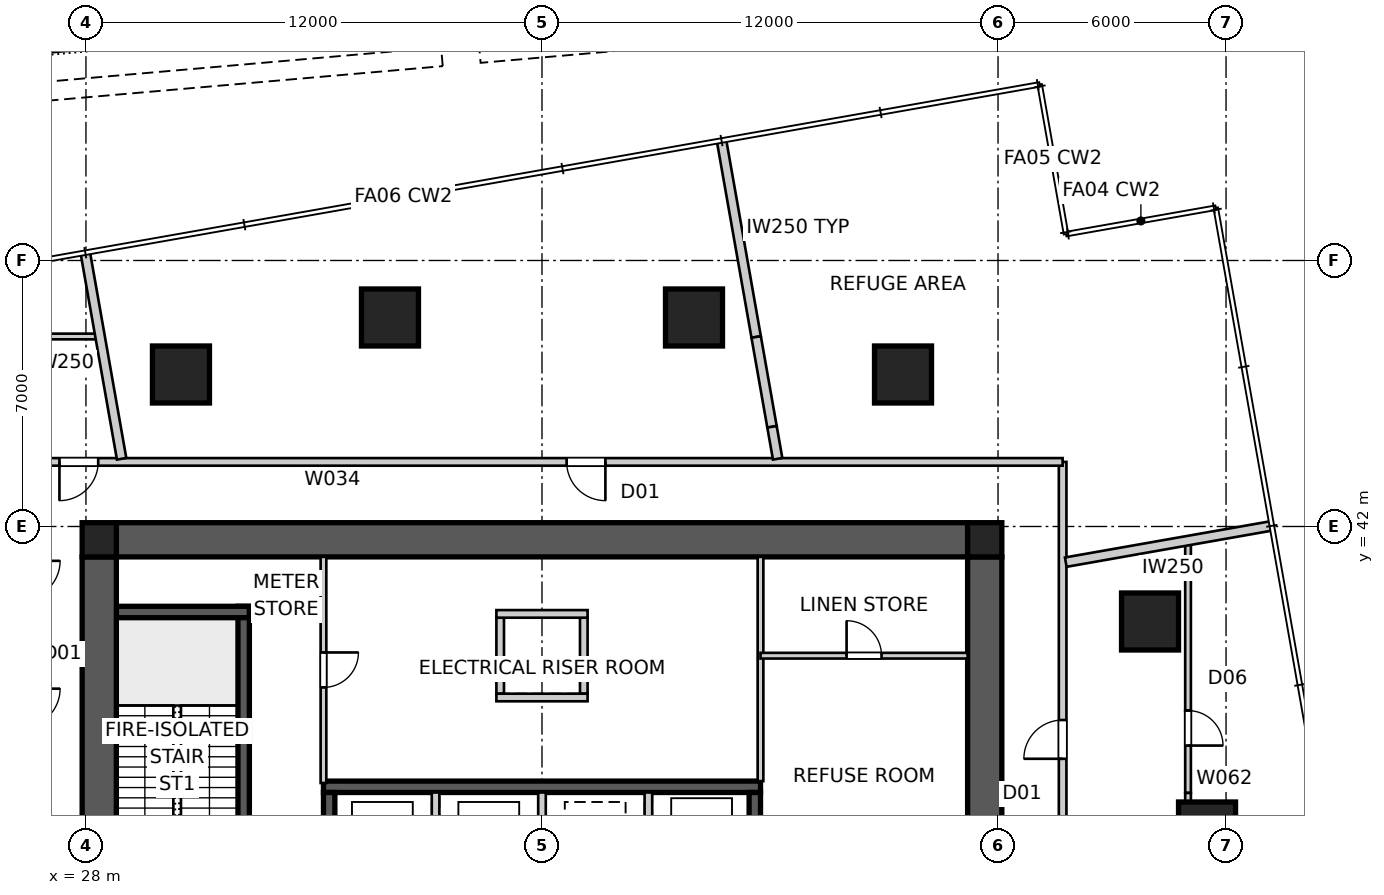
"""IFC4 building model, lengths in metres.
Left out: names, types, materials, properties, quantities, classifications, styles, units other than length and angle.
Written with IfcOpenShell. Run it as: python <this file> out.ifc"""

import sys

from ifc_helpers import new_model, si_unit, direction, frame, frame_2d, origin, origin_2d, place, context, subcontext, project, spatial, polyline, rectangle, outline, extrude, element, fill, save


model = new_model("IFC4")
c1 = context("Model", 3, precision=1e-05, world=origin(), true_north=direction((0.0, 1.0)))
c2 = subcontext(c1, "Body", "Model", "MODEL_VIEW")
j1 = project(units=[si_unit("LENGTHUNIT", "METRE"), si_unit("PLANEANGLEUNIT", "RADIAN")], contexts=[c1])
p1 = place(None, origin())
s1 = spatial("IfcSite", under=j1, at=p1, CompositionType="ELEMENT")
p2 = place(p1, origin())
s2 = spatial("IfcBuilding", under=s1, at=p2, CompositionType="ELEMENT")
p3 = place(p2, frame((0.0, 0.0, 74.4)))
s3 = spatial("IfcBuildingStorey", under=s2, at=p3, CompositionType="ELEMENT", Elevation=74.4)
p4 = place(p3, frame((28.8, 41.65, 0.0), z_axis=(0.0, 0.0, 1.0), x_axis=(1.0, 0.0, 0.0)))
e1 = element("IfcWall", 1, at=p4, inside=s3, PredefinedType="SHEAR", context=c2, shape_type="SweptSolid", body=[
    extrude(outline(polyline([(0.0, -0.45), (22.4, -0.45), (22.4, -0.025), (22.85, -0.025), (22.85, 0.025), (22.4, 0.025), (22.4, 0.45), (0.0, 0.45), (0.0, 0.025), (-0.45, 0.025), (-0.45, -0.025), (0.0, -0.025), (0.0, -0.45)])), origin(), (0.0, 0.0, 1.0), 5.0),
])
p5 = place(p3, frame((51.65, 18.8, 0.0), z_axis=(0.0, 0.0, 1.0), x_axis=(0.0, 1.0, 0.0)))
e2 = element("IfcWall", 2, at=p5, inside=s3, PredefinedType="SHEAR", context=c2, shape_type="SweptSolid", body=[
    extrude(outline(polyline([(0.0, -0.45), (22.4, -0.45), (22.4, -0.025), (22.85, -0.025), (22.85, 0.025), (22.4, 0.025), (22.4, 0.45), (0.0, 0.45), (0.0, 0.025), (-0.45, 0.025), (-0.45, -0.025), (0.0, -0.025), (0.0, -0.45)])), origin(), (0.0, 0.0, 1.0), 5.0),
])
p6 = place(p5, frame((11.14, 0.0, 0.0)))
e3 = element("IfcOpeningElement", 3, at=p6, cuts=e2, PredefinedType="OPENING", context=c2, shape_type="SweptSolid", body=[
    extrude(rectangle(XDim=1.02, YDim=2.4, at=frame_2d((0.51, 1.2))), frame((0.0, 0.46, 0.0), z_axis=(0.0, -1.0, 0.0), x_axis=(1.0, 0.0, 0.0)), (0.0, 0.0, 1.0), 0.92),
])
p7 = place(p3, frame((28.35, 41.2, 0.0), z_axis=(0.0, 0.0, 1.0), x_axis=(0.0, -1.0, 0.0)))
e4 = element("IfcWall", 4, at=p7, inside=s3, PredefinedType="SHEAR", context=c2, shape_type="SweptSolid", body=[
    extrude(outline(polyline([(0.0, -0.45), (22.4, -0.45), (22.4, -0.025), (22.85, -0.025), (22.85, 0.025), (22.4, 0.025), (22.4, 0.45), (0.0, 0.45), (0.0, 0.025), (-0.45, 0.025), (-0.45, -0.025), (0.0, -0.025), (0.0, -0.45)])), origin(), (0.0, 0.0, 1.0), 5.0),
])
p8 = place(p7, frame((11.14, 0.0, 0.0)))
e5 = element("IfcOpeningElement", 5, at=p8, cuts=e4, PredefinedType="OPENING", context=c2, shape_type="SweptSolid", body=[
    extrude(rectangle(XDim=1.02, YDim=2.4, at=frame_2d((0.51, 1.2))), frame((0.0, 0.46, 0.0), z_axis=(0.0, -1.0, 0.0), x_axis=(1.0, 0.0, 0.0)), (0.0, 0.0, 1.0), 0.92),
])
p9 = place(p3, frame((34.25, 35.15, 0.0), z_axis=(0.0, 0.0, 1.0), x_axis=(1.0, 0.0, 0.0)))
e6 = element("IfcWall", 6, at=p9, inside=s3, PredefinedType="SHEAR", context=c2, shape_type="SweptSolid", body=[
    extrude(rectangle(XDim=11.5, YDim=0.3, at=frame_2d((5.75, 0.0))), origin(), (0.0, 0.0, 1.0), 5.0),
])
p10 = place(p3, frame((34.4, 32.2, 0.0), z_axis=(0.0, 0.0, 1.0), x_axis=(0.0, 1.0, 0.0)))
e7 = element("IfcWall", 7, at=p10, inside=s3, PredefinedType="SHEAR", context=c2, shape_type="SweptSolid", body=[
    extrude(rectangle(XDim=2.8, YDim=0.3, at=frame_2d((1.4, 0.0))), origin(), (0.0, 0.0, 1.0), 5.0),
])
for number, where, z_axis, x_axis in (
    (8, (37.2, 32.2, 0.0), (0.0, 0.0, 1.0), (0.0, 1.0, 0.0)),
    (9, (40.0, 32.2, 0.0), (0.0, 0.0, 1.0), (0.0, 1.0, 0.0)),
    (10, (42.8, 32.2, 0.0), (0.0, 0.0, 1.0), (0.0, 1.0, 0.0)),
):
    element("IfcWall", number, at=place(p3, frame(where, z_axis=z_axis, x_axis=x_axis)), inside=s3, PredefinedType="SOLIDWALL", context=c2, shape_type="SweptSolid", body=[
        extrude(rectangle(XDim=2.8, YDim=0.2, at=frame_2d((1.4, 0.0))), origin(), (0.0, 0.0, 1.0), 5.0),
    ])
p11 = place(p3, frame((45.6, 32.2, 0.0), z_axis=(0.0, 0.0, 1.0), x_axis=(0.0, 1.0, 0.0)))
e11 = element("IfcWall", 11, at=p11, inside=s3, PredefinedType="SHEAR", context=c2, shape_type="SweptSolid", body=[
    extrude(rectangle(XDim=2.8, YDim=0.3, at=frame_2d((1.4, 0.0))), origin(), (0.0, 0.0, 1.0), 5.0),
])
p12 = place(p3, frame((32.15, 32.2, 0.0), z_axis=(0.0, 0.0, 1.0), x_axis=(0.0, 1.0, 0.0)))
e12 = element("IfcWall", 12, at=p12, inside=s3, PredefinedType="SHEAR", context=c2, shape_type="SweptSolid", body=[
    extrude(rectangle(XDim=7.7, YDim=0.3, at=frame_2d((3.85, 0.0))), origin(), (0.0, 0.0, 1.0), 5.0),
])
p13 = place(p3, frame((28.8, 39.75, 0.0), z_axis=(0.0, 0.0, 1.0), x_axis=(1.0, 0.0, 0.0)))
e13 = element("IfcWall", 13, at=p13, inside=s3, PredefinedType="SHEAR", context=c2, shape_type="SweptSolid", body=[
    extrude(rectangle(XDim=3.5, YDim=0.3, at=frame_2d((1.75, 0.0))), origin(), (0.0, 0.0, 1.0), 5.0),
])
for number, where, z_axis, x_axis in (
    (14, (38.9, 37.6, 0.0), (0.0, 0.0, 1.0), (0.0, 1.0, 0.0)),
    (15, (41.1, 37.6, 0.0), (0.0, 0.0, 1.0), (0.0, 1.0, 0.0)),
):
    element("IfcWall", number, at=place(p3, frame(where, z_axis=z_axis, x_axis=x_axis)), inside=s3, PredefinedType="SOLIDWALL", context=c2, shape_type="SweptSolid", body=[
        extrude(rectangle(XDim=2.0, YDim=0.2, at=frame_2d((1.0, 0.0))), origin(), (0.0, 0.0, 1.0), 5.0),
    ])
for number, where, z_axis, x_axis in (
    (16, (38.8, 37.5, 0.0), (0.0, 0.0, 1.0), (1.0, 0.0, 0.0)),
    (17, (38.8, 39.7, 0.0), (0.0, 0.0, 1.0), (1.0, 0.0, 0.0)),
):
    element("IfcWall", number, at=place(p3, frame(where, z_axis=z_axis, x_axis=x_axis)), inside=s3, PredefinedType="SOLIDWALL", context=c2, shape_type="SweptSolid", body=[
        extrude(rectangle(XDim=2.4, YDim=0.2, at=frame_2d((1.2, 0.0))), origin(), (0.0, 0.0, 1.0), 5.0),
    ])
for number, where, z_axis, x_axis in (
    (18, (51.65, 41.65, 0.0), (0.0, 0.0, 1.0), (1.0, 0.0, 0.0)),
    (19, (28.35, 41.65, 0.0), (0.0, 0.0, 1.0), (1.0, 0.0, 0.0)),
):
    element("IfcColumn", number, at=place(p3, frame(where, z_axis=z_axis, x_axis=x_axis)), inside=s3, PredefinedType="COLUMN", context=c2, shape_type="SweptSolid", body=[
        extrude(rectangle(XDim=0.9, YDim=0.9, at=origin_2d()), origin(), (0.0, 0.0, 1.0), 5.0),
    ])
for number, where, z_axis, x_axis in (
    (20, (57.5, 34.0, 0.0), (0.0, 0.0, 1.0), (1.0, 0.0, 0.0)),
    (21, (56.0, 39.5, 0.0), (0.0, 0.0, 1.0), (1.0, 0.0, 0.0)),
    (22, (49.5, 46.0, 0.0), (0.0, 0.0, 1.0), (1.0, 0.0, 0.0)),
    (23, (44.0, 47.5, 0.0), (0.0, 0.0, 1.0), (1.0, 0.0, 0.0)),
    (24, (36.0, 47.5, 0.0), (0.0, 0.0, 1.0), (1.0, 0.0, 0.0)),
    (25, (30.5, 46.0, 0.0), (0.0, 0.0, 1.0), (1.0, 0.0, 0.0)),
):
    element("IfcColumn", number, at=place(p3, frame(where, z_axis=z_axis, x_axis=x_axis)), inside=s3, PredefinedType="COLUMN", context=c2, shape_type="SweptSolid", body=[
        extrude(rectangle(XDim=1.5, YDim=1.5, at=origin_2d()), origin(), (0.0, 0.0, 1.0), 5.0),
    ])
p14 = place(p3, frame((53.7, 16.3, 0.0), z_axis=(0.0, 0.0, 1.0), x_axis=(0.0, 1.0, 0.0)))
e26 = element("IfcWall", 26, at=p14, inside=s3, PredefinedType="PARTITIONING", context=c2, shape_type="SweptSolid", body=[
    extrude(rectangle(XDim=27.4, YDim=0.2, at=frame_2d((13.7, 0.0))), origin(), (0.0, 0.0, 1.0), 4.85),
])
p15 = place(p14, frame((19.587, 0.0, 0.0)))
e27 = element("IfcOpeningElement", 27, at=p15, cuts=e26, PredefinedType="OPENING", context=c2, shape_type="SweptSolid", body=[
    extrude(rectangle(XDim=1.02, YDim=2.34, at=frame_2d((0.51, 1.17))), frame((0.0, 0.11, 0.0), z_axis=(0.0, -1.0, 0.0), x_axis=(1.0, 0.0, 0.0)), (0.0, 0.0, 1.0), 0.22),
])
p16 = place(p14, frame((10.973, 0.0, 0.0)))
e28 = element("IfcOpeningElement", 28, at=p16, cuts=e26, PredefinedType="OPENING", context=c2, shape_type="SweptSolid", body=[
    extrude(rectangle(XDim=1.02, YDim=2.34, at=frame_2d((0.51, 1.17))), frame((0.0, 0.11, 0.0), z_axis=(0.0, -1.0, 0.0), x_axis=(1.0, 0.0, 0.0)), (0.0, 0.0, 1.0), 0.22),
])
p17 = place(p14, frame((3.417, 0.0, 0.0)))
e29 = element("IfcOpeningElement", 29, at=p17, cuts=e26, PredefinedType="OPENING", context=c2, shape_type="SweptSolid", body=[
    extrude(rectangle(XDim=1.02, YDim=2.34, at=frame_2d((0.51, 1.17))), frame((0.0, 0.11, 0.0), z_axis=(0.0, -1.0, 0.0), x_axis=(1.0, 0.0, 0.0)), (0.0, 0.0, 1.0), 0.22),
])
p18 = place(p3, frame((53.7, 43.7, 0.0), z_axis=(0.0, 0.0, 1.0), x_axis=(-1.0, 0.0, 0.0)))
e30 = element("IfcWall", 30, at=p18, inside=s3, PredefinedType="PARTITIONING", context=c2, shape_type="SweptSolid", body=[
    extrude(rectangle(XDim=27.4, YDim=0.2, at=frame_2d((13.7, 0.0))), origin(), (0.0, 0.0, 1.0), 4.85),
])
p19 = place(p18, frame((12.031, 0.0, 0.0)))
e31 = element("IfcOpeningElement", 31, at=p19, cuts=e30, PredefinedType="OPENING", context=c2, shape_type="SweptSolid", body=[
    extrude(rectangle(XDim=1.02, YDim=2.34, at=frame_2d((0.51, 1.17))), frame((0.0, 0.11, 0.0), z_axis=(0.0, -1.0, 0.0), x_axis=(1.0, 0.0, 0.0)), (0.0, 0.0, 1.0), 0.22),
])
p20 = place(p18, frame((25.378, 0.0, 0.0)))
e32 = element("IfcOpeningElement", 32, at=p20, cuts=e30, PredefinedType="OPENING", context=c2, shape_type="SweptSolid", body=[
    extrude(rectangle(XDim=1.02, YDim=2.34, at=frame_2d((0.51, 1.17))), frame((0.0, 0.11, 0.0), z_axis=(0.0, -1.0, 0.0), x_axis=(1.0, 0.0, 0.0)), (0.0, 0.0, 1.0), 0.22),
])
p21 = place(p3, frame((59.205, 42.018, 0.0), z_axis=(0.0, 0.0, 1.0), x_axis=(-0.984803192417, -0.173674040102, 0.0)))
e33 = element("IfcWall", 33, at=p21, inside=s3, PredefinedType="PARTITIONING", context=c2, shape_type="SweptSolid", body=[
    extrude(rectangle(XDim=5.506, YDim=0.25, at=frame_2d((2.753, 0.0))), origin(), (0.0, 0.0, 1.0), 4.85),
])
p22 = place(p3, frame((44.724, 52.157, 0.0), z_axis=(0.0, 0.0, 1.0), x_axis=(0.173615529166, -0.984813509266, 0.0)))
e34 = element("IfcWall", 34, at=p22, inside=s3, PredefinedType="PARTITIONING", context=c2, shape_type="SweptSolid", body=[
    extrude(rectangle(XDim=5.25, YDim=0.25, at=frame_2d((2.625, 0.0))), origin(), (0.0, 0.0, 1.0), 4.85),
])
p23 = place(p3, frame((45.636, 46.987, 0.0), z_axis=(0.0, 0.0, 1.0), x_axis=(0.17362866226, -0.984811193906, 0.0)))
e35 = element("IfcWall", 35, at=p23, inside=s3, PredefinedType="PARTITIONING", context=c2, shape_type="SweptSolid", body=[
    extrude(rectangle(XDim=2.4, YDim=0.25, at=frame_2d((1.2, 0.0))), origin(), (0.0, 0.0, 1.0), 4.322),
])
p24 = place(p3, frame((46.052, 44.624, 0.0), z_axis=(0.0, 0.0, 1.0), x_axis=(0.173752728326, -0.984789312188, 0.0)))
e36 = element("IfcWall", 36, at=p24, inside=s3, PredefinedType="PARTITIONING", context=c2, shape_type="SweptSolid", body=[
    extrude(rectangle(XDim=0.854, YDim=0.25, at=frame_2d((0.427, 0.0))), origin(), (0.0, 0.0, 1.0), 4.85),
])
p25 = place(p3, frame((27.982, 49.205, 0.0), z_axis=(0.0, 0.0, 1.0), x_axis=(0.173674040102, -0.984803192417, 0.0)))
e37 = element("IfcWall", 37, at=p25, inside=s3, PredefinedType="PARTITIONING", context=c2, shape_type="SweptSolid", body=[
    extrude(rectangle(XDim=5.506, YDim=0.25, at=frame_2d((2.753, 0.0))), origin(), (0.0, 0.0, 1.0), 4.85),
])
p26 = place(p3, frame((34.25, 41.2, 0.0), z_axis=(0.0, 0.0, 1.0), x_axis=(0.0, -1.0, 0.0)))
e38 = element("IfcWall", 38, at=p26, inside=s3, PredefinedType="SOLIDWALL", context=c2, shape_type="SweptSolid", body=[
    extrude(rectangle(XDim=5.95, YDim=0.15, at=frame_2d((2.975, 0.0))), origin(), (0.0, 0.0, 1.0), 4.85),
])
p27 = place(p26, frame((2.515, 0.0, 0.0)))
e39 = element("IfcOpeningElement", 39, at=p27, cuts=e38, PredefinedType="OPENING", context=c2, shape_type="SweptSolid", body=[
    extrude(rectangle(XDim=0.92, YDim=2.1, at=frame_2d((0.46, 1.05))), frame((0.0, 0.085, 0.0), z_axis=(0.0, -1.0, 0.0), x_axis=(1.0, 0.0, 0.0)), (0.0, 0.0, 1.0), 0.17),
])
p28 = place(p3, frame((45.75, 41.2, 0.0), z_axis=(0.0, 0.0, 1.0), x_axis=(0.0, -1.0, 0.0)))
e40 = element("IfcWall", 40, at=p28, inside=s3, PredefinedType="SOLIDWALL", context=c2, shape_type="SweptSolid", body=[
    extrude(rectangle(XDim=5.9, YDim=0.15, at=frame_2d((2.95, 0.0))), origin(), (0.0, 0.0, 1.0), 4.85),
])
p29 = place(p3, frame((45.75, 38.6, 0.0), z_axis=(0.0, 0.0, 1.0), x_axis=(1.0, 0.0, 0.0)))
e41 = element("IfcWall", 41, at=p29, inside=s3, PredefinedType="SOLIDWALL", context=c2, shape_type="SweptSolid", body=[
    extrude(rectangle(XDim=5.45, YDim=0.15, at=frame_2d((2.725, 0.0))), origin(), (0.0, 0.0, 1.0), 4.85),
])
p30 = place(p29, frame((2.265, 0.0, 0.0)))
e42 = element("IfcOpeningElement", 42, at=p30, cuts=e41, PredefinedType="OPENING", context=c2, shape_type="SweptSolid", body=[
    extrude(rectangle(XDim=0.92, YDim=2.1, at=frame_2d((0.46, 1.05))), frame((0.0, 0.085, 0.0), z_axis=(0.0, -1.0, 0.0), x_axis=(1.0, 0.0, 0.0)), (0.0, 0.0, 1.0), 0.17),
])
p31 = place(p3, frame((57.0, 41.629, 0.0), z_axis=(0.0, 0.0, 1.0), x_axis=(0.0, -1.0, 0.0)))
e43 = element("IfcWall", 43, at=p31, inside=s3, PredefinedType="SOLIDWALL", context=c2, shape_type="SweptSolid", body=[
    extrude(rectangle(XDim=4.474, YDim=0.15, at=frame_2d((2.237, 0.0))), origin(), (0.0, 0.0, 1.0), 4.85),
])
p32 = place(p3, frame((57.0, 37.155, 0.0), z_axis=(0.0, 0.0, 1.0), x_axis=(0.0, -1.0, 0.0)))
e44 = element("IfcWall", 44, at=p32, inside=s3, PredefinedType="SOLIDWALL", context=c2, shape_type="SweptSolid", body=[
    extrude(rectangle(XDim=2.167, YDim=0.15, at=frame_2d((1.083, 0.0))), origin(), (0.0, 0.0, 1.0), 3.85),
])
p33 = place(p32, origin())
e45 = element("IfcOpeningElement", 45, at=p33, cuts=e44, PredefinedType="OPENING", context=c2, shape_type="SweptSolid", body=[
    extrude(rectangle(XDim=0.92, YDim=2.1, at=frame_2d((0.46, 1.05))), frame((0.0, 0.085, 0.0), z_axis=(0.0, -1.0, 0.0), x_axis=(1.0, 0.0, 0.0)), (0.0, 0.0, 1.0), 0.17),
])
p34 = place(p3, frame((57.0, 34.988, 0.0), z_axis=(0.0, 0.0, 1.0), x_axis=(0.0, -1.0, 0.0)))
e46 = element("IfcWall", 46, at=p34, inside=s3, PredefinedType="SOLIDWALL", context=c2, shape_type="SweptSolid", body=[
    extrude(rectangle(XDim=9.977, YDim=0.15, at=frame_2d((4.988, 0.0))), origin(), (0.0, 0.0, 1.0), 4.85),
])
p35 = place(p3, frame((23.0, 47.0, 0.0), z_axis=(0.0, 0.0, 1.0), x_axis=(1.0, 0.0, 0.0)))
e47 = element("IfcWall", 47, at=p35, inside=s3, PredefinedType="SOLIDWALL", context=c2, shape_type="SweptSolid", body=[
    extrude(rectangle(XDim=5.371, YDim=0.15, at=frame_2d((2.686, 0.0))), origin(), (0.0, 0.0, 1.0), 4.85),
])
p36 = place(p19, origin())
e48 = element("IfcDoor", 48, at=p36, inside=s3, OperationType="SINGLE_SWING_LEFT", PredefinedType="DOOR", context=c2, shape_type="SweptSolid", body=[
    extrude(rectangle(XDim=1.02, YDim=2.34, at=frame_2d((0.51, 1.17))), frame((0.0, 0.025, 0.0), z_axis=(0.0, -1.0, 0.0), x_axis=(1.0, 0.0, 0.0)), (0.0, 0.0, 1.0), 0.05),
])
fill(e31, e48)
p37 = place(p15, origin())
e49 = element("IfcDoor", 49, at=p37, inside=s3, OperationType="SINGLE_SWING_LEFT", PredefinedType="DOOR", context=c2, shape_type="SweptSolid", body=[
    extrude(rectangle(XDim=1.02, YDim=2.34, at=frame_2d((0.51, 1.17))), frame((0.0, 0.025, 0.0), z_axis=(0.0, -1.0, 0.0), x_axis=(1.0, 0.0, 0.0)), (0.0, 0.0, 1.0), 0.05),
])
fill(e27, e49)
p38 = place(p20, origin())
e50 = element("IfcDoor", 50, at=p38, inside=s3, OperationType="SINGLE_SWING_RIGHT", PredefinedType="DOOR", context=c2, shape_type="SweptSolid", body=[
    extrude(rectangle(XDim=1.02, YDim=2.34, at=frame_2d((0.51, 1.17))), frame((0.0, 0.025, 0.0), z_axis=(0.0, -1.0, 0.0), x_axis=(1.0, 0.0, 0.0)), (0.0, 0.0, 1.0), 0.05),
])
fill(e32, e50)
p39 = place(p30, origin())
e51 = element("IfcDoor", 51, at=p39, inside=s3, OperationType="SINGLE_SWING_LEFT", PredefinedType="DOOR", context=c2, shape_type="SweptSolid", body=[
    extrude(rectangle(XDim=0.92, YDim=2.1, at=frame_2d((0.46, 1.05))), frame((0.0, 0.025, 0.0), z_axis=(0.0, -1.0, 0.0), x_axis=(1.0, 0.0, 0.0)), (0.0, 0.0, 1.0), 0.05),
])
fill(e42, e51)
p40 = place(p27, origin())
e52 = element("IfcDoor", 52, at=p40, inside=s3, OperationType="SINGLE_SWING_LEFT", PredefinedType="DOOR", context=c2, shape_type="SweptSolid", body=[
    extrude(rectangle(XDim=0.92, YDim=2.1, at=frame_2d((0.46, 1.05))), frame((0.0, 0.025, 0.0), z_axis=(0.0, -1.0, 0.0), x_axis=(1.0, 0.0, 0.0)), (0.0, 0.0, 1.0), 0.05),
])
fill(e39, e52)
p41 = place(p33, origin())
e53 = element("IfcDoor", 53, at=p41, inside=s3, OperationType="SINGLE_SWING_RIGHT", PredefinedType="DOOR", context=c2, shape_type="SweptSolid", body=[
    extrude(rectangle(XDim=0.92, YDim=2.1, at=frame_2d((0.46, 1.05))), frame((0.0, 0.025, 0.0), z_axis=(0.0, -1.0, 0.0), x_axis=(1.0, 0.0, 0.0)), (0.0, 0.0, 1.0), 0.05),
])
fill(e45, e53)
save(model, sys.argv[1])
